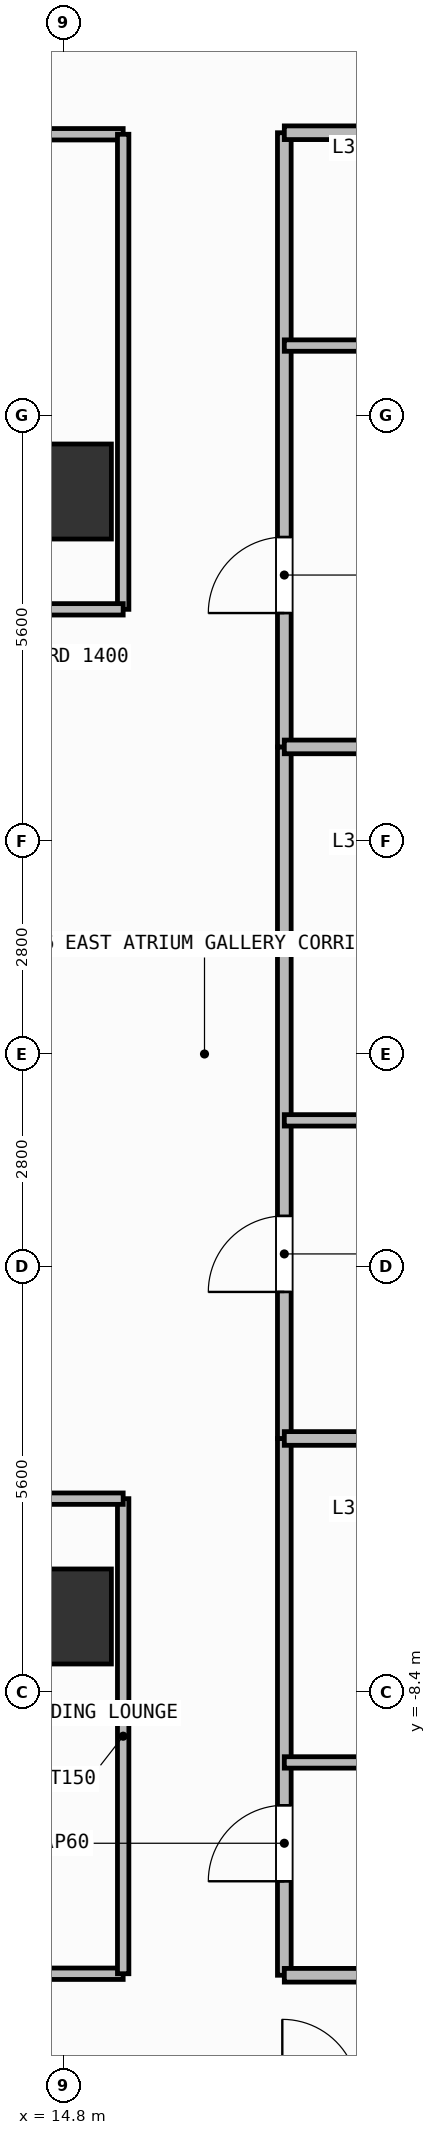
"""IFC4 building model, lengths in metres.
Left out: names, types, materials, properties, quantities, classifications, styles, units other than length and angle.
Written with IfcOpenShell. Run it as: python <this file> out.ifc"""

import sys

from ifc_helpers import new_model, si_unit, direction, frame, frame_2d, origin, origin_2d, place, context, subcontext, project, spatial, rectangle, extrude, element, fill, save


model = new_model("IFC4")
c1 = context("Model", 3, precision=1e-05, world=origin(), true_north=direction((0.0, 1.0)))
c2 = subcontext(c1, "Body", "Model", "MODEL_VIEW")
j1 = project(units=[si_unit("LENGTHUNIT", "METRE"), si_unit("PLANEANGLEUNIT", "RADIAN")], contexts=[c1])
p1 = place(None, origin())
s1 = spatial("IfcSite", under=j1, at=p1, CompositionType="ELEMENT")
p2 = place(p1, origin())
s2 = spatial("IfcBuilding", under=s1, at=p2, CompositionType="ELEMENT")
p3 = place(p2, frame((0.0, 0.0, 144.6)))
s3 = spatial("IfcBuildingStorey", under=s2, at=p3, CompositionType="ELEMENT", Elevation=144.6)
for number, where, z_axis, x_axis in (
    (1, (14.8, -7.4, 0.0), (0.0, 0.0, 1.0), (1.0, 0.0, 0.0)),
    (2, (14.8, 7.4, 0.0), (0.0, 0.0, 1.0), (1.0, 0.0, 0.0)),
):
    element("IfcColumn", number, at=place(p3, frame(where, z_axis=z_axis, x_axis=x_axis)), inside=s3, PredefinedType="COLUMN", context=c2, shape_type="SweptSolid", body=[
        extrude(rectangle(XDim=1.25, YDim=1.25, at=origin_2d()), origin(), (0.0, 0.0, 1.0), 3.9),
    ])
p4 = place(p3, frame((10.1, -12.1, 0.0), z_axis=(0.0, 0.0, 1.0), x_axis=(1.0, 0.0, 0.0)))
e3 = element("IfcWall", 3, at=p4, inside=s3, PredefinedType="PARTITIONING", context=c2, shape_type="SweptSolid", body=[
    extrude(rectangle(XDim=5.48, YDim=0.15, at=frame_2d((2.74, 0.0))), origin(), (0.0, 0.0, 1.0), 3.68),
])
p5 = place(p4, frame((2.29, 0.0, 0.0)))
e4 = element("IfcOpeningElement", 4, at=p5, cuts=e3, PredefinedType="OPENING", context=c2, shape_type="SweptSolid", body=[
    extrude(rectangle(XDim=0.9, YDim=2.1, at=frame_2d((0.45, 1.05))), frame((0.0, 0.085, 0.0), z_axis=(0.0, -1.0, 0.0), x_axis=(1.0, 0.0, 0.0)), (0.0, 0.0, 1.0), 0.17),
])
p6 = place(p3, frame((8.36, 12.1, 0.0), z_axis=(0.0, 0.0, 1.0), x_axis=(1.0, 0.0, 0.0)))
e5 = element("IfcWall", 5, at=p6, inside=s3, PredefinedType="PARTITIONING", context=c2, shape_type="SweptSolid", body=[
    extrude(rectangle(XDim=7.22, YDim=0.15, at=frame_2d((3.61, 0.0))), origin(), (0.0, 0.0, 1.0), 3.68),
])
p7 = place(p6, frame((3.513, 0.0, 0.0)))
e6 = element("IfcOpeningElement", 6, at=p7, cuts=e5, PredefinedType="OPENING", context=c2, shape_type="SweptSolid", body=[
    extrude(rectangle(XDim=0.9, YDim=2.1, at=frame_2d((0.45, 1.05))), frame((0.0, 0.085, 0.0), z_axis=(0.0, -1.0, 0.0), x_axis=(1.0, 0.0, 0.0)), (0.0, 0.0, 1.0), 0.17),
])
p8 = place(p3, frame((17.7, -12.12, 0.0), z_axis=(0.0, 0.0, 1.0), x_axis=(0.0, 1.0, 0.0)))
e7 = element("IfcWall", 7, at=p8, inside=s3, PredefinedType="PARTITIONING", context=c2, shape_type="SweptSolid", body=[
    extrude(rectangle(XDim=7.062, YDim=0.18, at=frame_2d((3.531, 0.0))), origin(), (0.0, 0.0, 1.0), 3.68),
])
p9 = place(p8, frame((1.237, 0.0, 0.0)))
e8 = element("IfcOpeningElement", 8, at=p9, cuts=e7, PredefinedType="OPENING", context=c2, shape_type="SweptSolid", body=[
    extrude(rectangle(XDim=1.0, YDim=2.2, at=frame_2d((0.5, 1.1))), frame((0.0, 0.1, 0.0), z_axis=(0.0, -1.0, 0.0), x_axis=(1.0, 0.0, 0.0)), (0.0, 0.0, 1.0), 0.2),
])
p10 = place(p3, frame((17.7, -9.32, 0.0), z_axis=(0.0, 0.0, 1.0), x_axis=(1.0, 0.0, 0.0)))
e9 = element("IfcWall", 9, at=p10, inside=s3, PredefinedType="PARTITIONING", context=c2, shape_type="SweptSolid", body=[
    extrude(rectangle(XDim=3.552, YDim=0.15, at=frame_2d((1.776, 0.0))), origin(), (0.0, 0.0, 1.0), 3.68),
])
p11 = place(p10, frame((2.372, 0.0, 0.0)))
e10 = element("IfcOpeningElement", 10, at=p11, cuts=e9, PredefinedType="OPENING", context=c2, shape_type="SweptSolid", body=[
    extrude(rectangle(XDim=0.85, YDim=2.1, at=frame_2d((0.425, 1.05))), frame((0.0, 0.085, 0.0), z_axis=(0.0, -1.0, 0.0), x_axis=(1.0, 0.0, 0.0)), (0.0, 0.0, 1.0), 0.17),
])
p12 = place(p3, frame((17.7, -5.058, 0.0), z_axis=(0.0, 0.0, 1.0), x_axis=(0.0, 1.0, 0.0)))
e11 = element("IfcWall", 11, at=p12, inside=s3, PredefinedType="PARTITIONING", context=c2, shape_type="SweptSolid", body=[
    extrude(rectangle(XDim=9.098, YDim=0.18, at=frame_2d((4.549, 0.0))), origin(), (0.0, 0.0, 1.0), 3.68),
])
p13 = place(p12, frame((1.928, 0.0, 0.0)))
e12 = element("IfcOpeningElement", 12, at=p13, cuts=e11, PredefinedType="OPENING", context=c2, shape_type="SweptSolid", body=[
    extrude(rectangle(XDim=1.0, YDim=2.2, at=frame_2d((0.5, 1.1))), frame((0.0, 0.1, 0.0), z_axis=(0.0, -1.0, 0.0), x_axis=(1.0, 0.0, 0.0)), (0.0, 0.0, 1.0), 0.2),
])
p14 = place(p3, frame((17.7, -0.873, 0.0), z_axis=(0.0, 0.0, 1.0), x_axis=(1.0, 0.0, 0.0)))
e13 = element("IfcWall", 13, at=p14, inside=s3, PredefinedType="PARTITIONING", context=c2, shape_type="SweptSolid", body=[
    extrude(rectangle(XDim=3.552, YDim=0.15, at=frame_2d((1.776, 0.0))), origin(), (0.0, 0.0, 1.0), 3.68),
])
p15 = place(p14, frame((1.351, 0.0, 0.0)))
e14 = element("IfcOpeningElement", 14, at=p15, cuts=e13, PredefinedType="OPENING", context=c2, shape_type="SweptSolid", body=[
    extrude(rectangle(XDim=0.85, YDim=2.1, at=frame_2d((0.425, 1.05))), frame((0.0, 0.085, 0.0), z_axis=(0.0, -1.0, 0.0), x_axis=(1.0, 0.0, 0.0)), (0.0, 0.0, 1.0), 0.17),
])
p16 = place(p3, frame((17.7, 4.04, 0.0), z_axis=(0.0, 0.0, 1.0), x_axis=(0.0, 1.0, 0.0)))
e15 = element("IfcWall", 15, at=p16, inside=s3, PredefinedType="PARTITIONING", context=c2, shape_type="SweptSolid", body=[
    extrude(rectangle(XDim=8.08, YDim=0.18, at=frame_2d((4.04, 0.0))), origin(), (0.0, 0.0, 1.0), 3.68),
])
p17 = place(p16, frame((1.761, 0.0, 0.0)))
e16 = element("IfcOpeningElement", 16, at=p17, cuts=e15, PredefinedType="OPENING", context=c2, shape_type="SweptSolid", body=[
    extrude(rectangle(XDim=1.0, YDim=2.2, at=frame_2d((0.5, 1.1))), frame((0.0, 0.1, 0.0), z_axis=(0.0, -1.0, 0.0), x_axis=(1.0, 0.0, 0.0)), (0.0, 0.0, 1.0), 0.2),
])
p18 = place(p3, frame((17.7, 9.32, 0.0), z_axis=(0.0, 0.0, 1.0), x_axis=(1.0, 0.0, 0.0)))
e17 = element("IfcWall", 17, at=p18, inside=s3, PredefinedType="PARTITIONING", context=c2, shape_type="SweptSolid", body=[
    extrude(rectangle(XDim=3.552, YDim=0.15, at=frame_2d((1.776, 0.0))), origin(), (0.0, 0.0, 1.0), 3.68),
])
p19 = place(p18, frame((2.372, 0.0, 0.0)))
e18 = element("IfcOpeningElement", 18, at=p19, cuts=e17, PredefinedType="OPENING", context=c2, shape_type="SweptSolid", body=[
    extrude(rectangle(XDim=0.85, YDim=2.1, at=frame_2d((0.425, 1.05))), frame((0.0, 0.085, 0.0), z_axis=(0.0, -1.0, 0.0), x_axis=(1.0, 0.0, 0.0)), (0.0, 0.0, 1.0), 0.17),
])
p20 = place(p3, frame((15.58, -12.1, 0.0), z_axis=(0.0, 0.0, 1.0), x_axis=(0.0, 1.0, 0.0)))
e19 = element("IfcWall", 19, at=p20, inside=s3, PredefinedType="PARTITIONING", context=c2, shape_type="SweptSolid", body=[
    extrude(rectangle(XDim=6.25, YDim=0.15, at=frame_2d((3.125, 0.0))), origin(), (0.0, 0.0, 1.0), 3.68),
])
p21 = place(p3, frame((8.96, -5.85, 0.0), z_axis=(0.0, 0.0, 1.0), x_axis=(1.0, 0.0, 0.0)))
e20 = element("IfcWall", 20, at=p21, inside=s3, PredefinedType="PARTITIONING", context=c2, shape_type="SweptSolid", body=[
    extrude(rectangle(XDim=6.62, YDim=0.15, at=frame_2d((3.31, 0.0))), origin(), (0.0, 0.0, 1.0), 3.68),
])
p22 = place(p3, frame((15.58, 5.85, 0.0), z_axis=(0.0, 0.0, 1.0), x_axis=(0.0, 1.0, 0.0)))
e21 = element("IfcWall", 21, at=p22, inside=s3, PredefinedType="PARTITIONING", context=c2, shape_type="SweptSolid", body=[
    extrude(rectangle(XDim=6.25, YDim=0.15, at=frame_2d((3.125, 0.0))), origin(), (0.0, 0.0, 1.0), 3.68),
])
p23 = place(p3, frame((8.96, 5.85, 0.0), z_axis=(0.0, 0.0, 1.0), x_axis=(1.0, 0.0, 0.0)))
e22 = element("IfcWall", 22, at=p23, inside=s3, PredefinedType="PARTITIONING", context=c2, shape_type="SweptSolid", body=[
    extrude(rectangle(XDim=6.62, YDim=0.15, at=frame_2d((3.31, 0.0))), origin(), (0.0, 0.0, 1.0), 3.68),
])
for number, where, z_axis, x_axis in (
    (23, (17.7, -5.058, 0.0), (0.0, 0.0, 1.0), (1.0, 0.0, 0.0)),
    (24, (17.7, 4.04, 0.0), (0.0, 0.0, 1.0), (1.0, 0.0, 0.0)),
    (25, (17.7, -12.12, 0.0), (0.0, 0.0, 1.0), (1.0, 0.0, 0.0)),
    (26, (17.7, 12.12, 0.0), (0.0, 0.0, 1.0), (1.0, 0.0, 0.0)),
):
    element("IfcWall", number, at=place(p3, frame(where, z_axis=z_axis, x_axis=x_axis)), inside=s3, PredefinedType="PARTITIONING", context=c2, shape_type="SweptSolid", body=[
        extrude(rectangle(XDim=9.83, YDim=0.18, at=frame_2d((4.915, 0.0))), origin(), (0.0, 0.0, 1.0), 3.68),
    ])
p24 = place(p9, origin())
e27 = element("IfcDoor", 27, at=p24, inside=s3, OperationType="SINGLE_SWING_LEFT", PredefinedType="DOOR", context=c2, shape_type="SweptSolid", body=[
    extrude(rectangle(XDim=1.0, YDim=2.2, at=frame_2d((0.5, 1.1))), frame((0.0, 0.025, 0.0), z_axis=(0.0, -1.0, 0.0), x_axis=(1.0, 0.0, 0.0)), (0.0, 0.0, 1.0), 0.05),
])
fill(e8, e27)
p25 = place(p13, origin())
e28 = element("IfcDoor", 28, at=p25, inside=s3, OperationType="SINGLE_SWING_LEFT", PredefinedType="DOOR", context=c2, shape_type="SweptSolid", body=[
    extrude(rectangle(XDim=1.0, YDim=2.2, at=frame_2d((0.5, 1.1))), frame((0.0, 0.025, 0.0), z_axis=(0.0, -1.0, 0.0), x_axis=(1.0, 0.0, 0.0)), (0.0, 0.0, 1.0), 0.05),
])
fill(e12, e28)
p26 = place(p17, origin())
e29 = element("IfcDoor", 29, at=p26, inside=s3, OperationType="SINGLE_SWING_LEFT", PredefinedType="DOOR", context=c2, shape_type="SweptSolid", body=[
    extrude(rectangle(XDim=1.0, YDim=2.2, at=frame_2d((0.5, 1.1))), frame((0.0, 0.025, 0.0), z_axis=(0.0, -1.0, 0.0), x_axis=(1.0, 0.0, 0.0)), (0.0, 0.0, 1.0), 0.05),
])
fill(e16, e29)
save(model, sys.argv[1])
